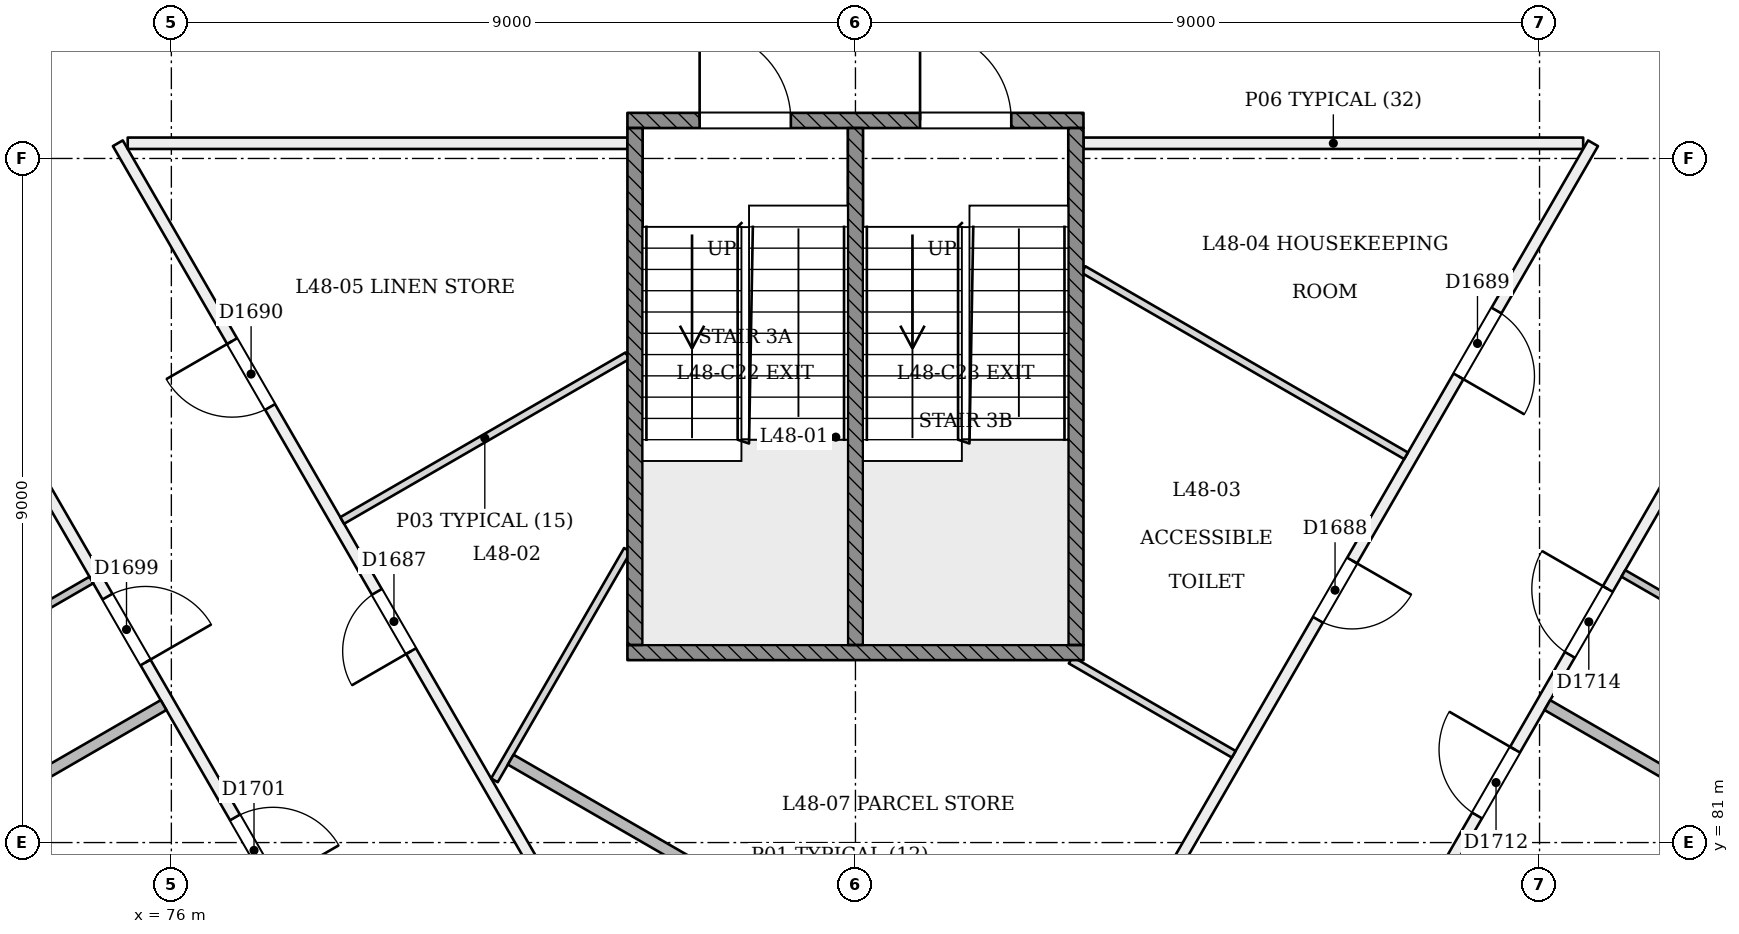
"""IFC4 building model, lengths in metres.
Left out: names, types, materials, properties, quantities, classifications, styles, units other than length and angle.
Written with IfcOpenShell. Run it as: python <this file> out.ifc"""

import sys

from ifc_helpers import new_model, si_unit, direction, frame, frame_2d, origin, place, context, subcontext, project, spatial, rectangle, extrude, element, fill, save


model = new_model("IFC4")
c1 = context("Model", 3, precision=1e-05, world=origin(), true_north=direction((0.0, 1.0)))
c2 = subcontext(c1, "Body", "Model", "MODEL_VIEW")
j1 = project(units=[si_unit("LENGTHUNIT", "METRE"), si_unit("PLANEANGLEUNIT", "RADIAN")], contexts=[c1])
p1 = place(None, origin())
s1 = spatial("IfcSite", under=j1, at=p1, CompositionType="ELEMENT")
p2 = place(p1, origin())
s2 = spatial("IfcBuilding", under=s1, at=p2, CompositionType="ELEMENT")
p3 = place(p2, frame((0.0, 0.0, 185.4)))
s3 = spatial("IfcBuildingStorey", under=s2, at=p3, CompositionType="ELEMENT", Elevation=185.4)
p4 = place(p3, frame((88.0, 90.2, 0.0), z_axis=(0.0, 0.0, 1.0), x_axis=(1.0, 0.0, 0.0)))
e1 = element("IfcWall", 1, at=p4, inside=s3, PredefinedType="PARTITIONING", context=c2, shape_type="SweptSolid", body=[
    extrude(rectangle(XDim=6.574, YDim=0.15, at=frame_2d((3.287, 0.0))), origin(), (0.0, 0.0, 1.0), 3.3),
])
p5 = place(p3, frame((85.0, 73.392, 0.0), z_axis=(0.0, 0.0, 1.0), x_axis=(-0.500003025806, 0.866023656828, 0.0)))
e2 = element("IfcWall", 2, at=p5, inside=s3, PredefinedType="PARTITIONING", context=c2, shape_type="SweptSolid", body=[
    extrude(rectangle(XDim=19.408, YDim=0.15, at=frame_2d((9.704, 0.0))), origin(), (0.0, 0.0, 1.0), 3.3),
])
p6 = place(p5, frame((11.693, 0.0, 0.0)))
e3 = element("IfcOpeningElement", 3, at=p6, cuts=e2, PredefinedType="OPENING", context=c2, shape_type="SweptSolid", body=[
    extrude(rectangle(XDim=0.9, YDim=2.1, at=frame_2d((0.45, 1.05))), frame((0.0, 0.085, 0.0), z_axis=(0.0, -1.0, 0.0), x_axis=(1.0, 0.0, 0.0)), (0.0, 0.0, 1.0), 0.171),
])
p7 = place(p5, frame((15.402, 0.0, 0.0)))
e4 = element("IfcOpeningElement", 4, at=p7, cuts=e2, PredefinedType="OPENING", context=c2, shape_type="SweptSolid", body=[
    extrude(rectangle(XDim=1.0, YDim=2.1, at=frame_2d((0.5, 1.05))), frame((0.0, 0.085, 0.0), z_axis=(0.0, -1.0, 0.0), x_axis=(1.0, 0.0, 0.0)), (0.0, 0.0, 1.0), 0.171),
])
p8 = place(p5, frame((3.845, 0.0, 0.0)))
e5 = element("IfcOpeningElement", 5, at=p8, cuts=e2, PredefinedType="OPENING", context=c2, shape_type="SweptSolid", body=[
    extrude(rectangle(XDim=1.0, YDim=2.1, at=frame_2d((0.5, 1.05))), frame((0.0, 0.085, 0.0), z_axis=(0.0, -1.0, 0.0), x_axis=(1.0, 0.0, 0.0)), (0.0, 0.0, 1.0), 0.171),
])
p9 = place(p3, frame((75.426, 90.2, 0.0), z_axis=(0.0, 0.0, 1.0), x_axis=(1.0, 0.0, 0.0)))
e6 = element("IfcWall", 6, at=p9, inside=s3, PredefinedType="PARTITIONING", context=c2, shape_type="SweptSolid", body=[
    extrude(rectangle(XDim=6.574, YDim=0.15, at=frame_2d((3.287, 0.0))), origin(), (0.0, 0.0, 1.0), 3.3),
])
p10 = place(p3, frame((94.704, 90.2, 0.0), z_axis=(0.0, 0.0, 1.0), x_axis=(-0.500004551397, -0.866022776018, 0.0)))
e7 = element("IfcWall", 7, at=p10, inside=s3, PredefinedType="PARTITIONING", context=c2, shape_type="SweptSolid", body=[
    extrude(rectangle(XDim=19.278, YDim=0.15, at=frame_2d((9.639, 0.0))), origin(), (0.0, 0.0, 1.0), 3.3),
])
p11 = place(p10, frame((6.339, 0.0, 0.0)))
e8 = element("IfcOpeningElement", 8, at=p11, cuts=e7, PredefinedType="OPENING", context=c2, shape_type="SweptSolid", body=[
    extrude(rectangle(XDim=0.9, YDim=2.1, at=frame_2d((0.45, 1.05))), frame((0.0, 0.085, 0.0), z_axis=(0.0, -1.0, 0.0), x_axis=(1.0, 0.0, 0.0)), (0.0, 0.0, 1.0), 0.171),
])
p12 = place(p10, frame((2.541, 0.0, 0.0)))
e9 = element("IfcOpeningElement", 9, at=p12, cuts=e7, PredefinedType="OPENING", context=c2, shape_type="SweptSolid", body=[
    extrude(rectangle(XDim=1.0, YDim=2.1, at=frame_2d((0.5, 1.05))), frame((0.0, 0.085, 0.0), z_axis=(0.0, -1.0, 0.0), x_axis=(1.0, 0.0, 0.0)), (0.0, 0.0, 1.0), 0.171),
])
p13 = place(p10, frame((11.64, 0.0, 0.0)))
e10 = element("IfcOpeningElement", 10, at=p13, cuts=e7, PredefinedType="OPENING", context=c2, shape_type="SweptSolid", body=[
    extrude(rectangle(XDim=1.0, YDim=2.1, at=frame_2d((0.5, 1.05))), frame((0.0, 0.085, 0.0), z_axis=(0.0, -1.0, 0.0), x_axis=(1.0, 0.0, 0.0)), (0.0, 0.0, 1.0), 0.171),
])
p14 = place(p3, frame((71.716, 90.2, 0.0), z_axis=(0.0, 0.0, 1.0), x_axis=(0.500001662319, -0.866024444042, 0.0)))
e11 = element("IfcWall", 11, at=p14, inside=s3, PredefinedType="PARTITIONING", context=c2, shape_type="SweptSolid", body=[
    extrude(rectangle(XDim=26.492, YDim=0.15, at=frame_2d((13.246, 0.0))), origin(), (0.0, 0.0, 1.0), 2.9),
])
p15 = place(p14, frame((0.23, 0.0, 0.0)))
e12 = element("IfcOpeningElement", 12, at=p15, cuts=e11, PredefinedType="OPENING", context=c2, shape_type="SweptSolid", body=[
    extrude(rectangle(XDim=1.0, YDim=2.1, at=frame_2d((0.5, 1.05))), frame((0.0, 0.085, 0.0), z_axis=(0.0, -1.0, 0.0), x_axis=(1.0, 0.0, 0.0)), (0.0, 0.0, 1.0), 0.171),
])
p16 = place(p14, frame((6.887, 0.0, 0.0)))
e13 = element("IfcOpeningElement", 13, at=p16, cuts=e11, PredefinedType="OPENING", context=c2, shape_type="SweptSolid", body=[
    extrude(rectangle(XDim=1.0, YDim=2.1, at=frame_2d((0.5, 1.05))), frame((0.0, 0.085, 0.0), z_axis=(0.0, -1.0, 0.0), x_axis=(1.0, 0.0, 0.0)), (0.0, 0.0, 1.0), 0.171),
])
p17 = place(p14, frame((10.242, 0.0, 0.0)))
e14 = element("IfcOpeningElement", 14, at=p17, cuts=e11, PredefinedType="OPENING", context=c2, shape_type="SweptSolid", body=[
    extrude(rectangle(XDim=1.0, YDim=2.1, at=frame_2d((0.5, 1.05))), frame((0.0, 0.085, 0.0), z_axis=(0.0, -1.0, 0.0), x_axis=(1.0, 0.0, 0.0)), (0.0, 0.0, 1.0), 0.171),
])
p18 = place(p14, frame((14.742, 0.0, 0.0)))
e15 = element("IfcOpeningElement", 15, at=p18, cuts=e11, PredefinedType="OPENING", context=c2, shape_type="SweptSolid", body=[
    extrude(rectangle(XDim=1.0, YDim=2.1, at=frame_2d((0.5, 1.05))), frame((0.0, 0.085, 0.0), z_axis=(0.0, -1.0, 0.0), x_axis=(1.0, 0.0, 0.0)), (0.0, 0.0, 1.0), 0.171),
])
p19 = place(p14, frame((18.212, 0.0, 0.0)))
e16 = element("IfcOpeningElement", 16, at=p19, cuts=e11, PredefinedType="OPENING", context=c2, shape_type="SweptSolid", body=[
    extrude(rectangle(XDim=1.0, YDim=2.1, at=frame_2d((0.5, 1.05))), frame((0.0, 0.085, 0.0), z_axis=(0.0, -1.0, 0.0), x_axis=(1.0, 0.0, 0.0)), (0.0, 0.0, 1.0), 0.171),
])
p20 = place(p14, frame((24.771, 0.0, 0.0)))
e17 = element("IfcOpeningElement", 17, at=p20, cuts=e11, PredefinedType="OPENING", context=c2, shape_type="SweptSolid", body=[
    extrude(rectangle(XDim=1.0, YDim=2.1, at=frame_2d((0.5, 1.05))), frame((0.0, 0.085, 0.0), z_axis=(0.0, -1.0, 0.0), x_axis=(1.0, 0.0, 0.0)), (0.0, 0.0, 1.0), 0.171),
])
p21 = place(p3, frame((85.076, 67.323, 0.0), z_axis=(0.0, 0.0, 1.0), x_axis=(0.499999794657, 0.866025522339, 0.0)))
e18 = element("IfcWall", 18, at=p21, inside=s3, PredefinedType="PARTITIONING", context=c2, shape_type="SweptSolid", body=[
    extrude(rectangle(XDim=26.416, YDim=0.15, at=frame_2d((13.208, 0.0))), origin(), (0.0, 0.0, 1.0), 2.9),
])
p22 = place(p21, frame((0.457, 0.0, 0.0)))
e19 = element("IfcOpeningElement", 19, at=p22, cuts=e18, PredefinedType="OPENING", context=c2, shape_type="SweptSolid", body=[
    extrude(rectangle(XDim=1.2, YDim=2.1, at=frame_2d((0.6, 1.05))), frame((0.0, 0.085, 0.0), z_axis=(0.0, -1.0, 0.0), x_axis=(1.0, 0.0, 0.0)), (0.0, 0.0, 1.0), 0.171),
])
p23 = place(p21, frame((7.32, 0.0, 0.0)))
e20 = element("IfcOpeningElement", 20, at=p23, cuts=e18, PredefinedType="OPENING", context=c2, shape_type="SweptSolid", body=[
    extrude(rectangle(XDim=1.0, YDim=2.1, at=frame_2d((0.5, 1.05))), frame((0.0, 0.085, 0.0), z_axis=(0.0, -1.0, 0.0), x_axis=(1.0, 0.0, 0.0)), (0.0, 0.0, 1.0), 0.171),
])
p24 = place(p21, frame((9.645, 0.0, 0.0)))
e21 = element("IfcOpeningElement", 21, at=p24, cuts=e18, PredefinedType="OPENING", context=c2, shape_type="SweptSolid", body=[
    extrude(rectangle(XDim=1.0, YDim=2.1, at=frame_2d((0.5, 1.05))), frame((0.0, 0.085, 0.0), z_axis=(0.0, -1.0, 0.0), x_axis=(1.0, 0.0, 0.0)), (0.0, 0.0, 1.0), 0.171),
])
p25 = place(p21, frame((16.204, 0.0, 0.0)))
e22 = element("IfcOpeningElement", 22, at=p25, cuts=e18, PredefinedType="OPENING", context=c2, shape_type="SweptSolid", body=[
    extrude(rectangle(XDim=1.0, YDim=2.1, at=frame_2d((0.5, 1.05))), frame((0.0, 0.085, 0.0), z_axis=(0.0, -1.0, 0.0), x_axis=(1.0, 0.0, 0.0)), (0.0, 0.0, 1.0), 0.171),
])
p26 = place(p21, frame((18.645, 0.0, 0.0)))
e23 = element("IfcOpeningElement", 23, at=p26, cuts=e18, PredefinedType="OPENING", context=c2, shape_type="SweptSolid", body=[
    extrude(rectangle(XDim=1.0, YDim=2.1, at=frame_2d((0.5, 1.05))), frame((0.0, 0.085, 0.0), z_axis=(0.0, -1.0, 0.0), x_axis=(1.0, 0.0, 0.0)), (0.0, 0.0, 1.0), 0.171),
])
p27 = place(p21, frame((24.158, 0.0, 0.0)))
e24 = element("IfcOpeningElement", 24, at=p27, cuts=e18, PredefinedType="OPENING", context=c2, shape_type="SweptSolid", body=[
    extrude(rectangle(XDim=1.0, YDim=2.1, at=frame_2d((0.5, 1.05))), frame((0.0, 0.085, 0.0), z_axis=(0.0, -1.0, 0.0), x_axis=(1.0, 0.0, 0.0)), (0.0, 0.0, 1.0), 0.171),
])
p28 = place(p3, frame((82.0, 87.404, 0.0), z_axis=(0.0, 0.0, 1.0), x_axis=(-0.866022320763, -0.500005339912, 0.0)))
e25 = element("IfcWall", 25, at=p28, inside=s3, PredefinedType="PARTITIONING", context=c2, shape_type="SweptSolid", body=[
    extrude(rectangle(XDim=4.333, YDim=0.1, at=frame_2d((2.167, 0.0))), origin(), (0.0, 0.0, 1.0), 3.3),
])
p29 = place(p3, frame((80.25, 81.819, 0.0), z_axis=(0.0, 0.0, 1.0), x_axis=(0.499988162555, 0.866032238029, 0.0)))
e26 = element("IfcWall", 26, at=p29, inside=s3, PredefinedType="PARTITIONING", context=c2, shape_type="SweptSolid", body=[
    extrude(rectangle(XDim=3.5, YDim=0.1, at=frame_2d((1.75, 0.0))), origin(), (0.0, 0.0, 1.0), 3.3),
])
p30 = place(p3, frame((92.244, 86.089, 0.0), z_axis=(0.0, 0.0, 1.0), x_axis=(-0.866036242063, 0.49998122708, 0.0)))
e27 = element("IfcWall", 27, at=p30, inside=s3, PredefinedType="PARTITIONING", context=c2, shape_type="SweptSolid", body=[
    extrude(rectangle(XDim=4.9, YDim=0.1, at=frame_2d((2.45, 0.0))), origin(), (0.0, 0.0, 1.0), 3.3),
])
p31 = place(p3, frame((87.832, 83.4, 0.0), z_axis=(0.0, 0.0, 1.0), x_axis=(0.866019742871, -0.500009804862, 0.0)))
e28 = element("IfcWall", 28, at=p31, inside=s3, PredefinedType="PARTITIONING", context=c2, shape_type="SweptSolid", body=[
    extrude(rectangle(XDim=2.476, YDim=0.1, at=frame_2d((1.238, 0.0))), origin(), (0.0, 0.0, 1.0), 3.3),
])
p32 = place(p3, frame((87.568, 77.99, 0.0), z_axis=(0.0, 0.0, 1.0), x_axis=(-0.866018040531, 0.500012753312, 0.0)))
e29 = element("IfcWall", 29, at=p32, inside=s3, PredefinedType="PARTITIONING", context=c2, shape_type="SweptSolid", body=[
    extrude(rectangle(XDim=8.202, YDim=0.15, at=frame_2d((4.101, 0.0))), origin(), (0.0, 0.0, 1.0), 3.3),
])
p33 = place(p3, frame((74.947, 84.454, 0.0), z_axis=(0.0, 0.0, 1.0), x_axis=(-0.86601045545, -0.500025890382, 0.0)))
e30 = element("IfcWall", 30, at=p33, inside=s3, PredefinedType="PARTITIONING", context=c2, shape_type="SweptSolid", body=[
    extrude(rectangle(XDim=2.925, YDim=0.1, at=frame_2d((1.462, 0.0))), origin(), (0.0, 0.0, 1.0), 3.3),
])
p34 = place(p33, frame((0.975, 0.0, 0.0)))
e31 = element("IfcOpeningElement", 31, at=p34, cuts=e30, PredefinedType="OPENING", context=c2, shape_type="SweptSolid", body=[
    extrude(rectangle(XDim=0.9, YDim=2.1, at=frame_2d((0.45, 1.05))), frame((0.0, 0.061, 0.0), z_axis=(0.0, -1.0, 0.0), x_axis=(1.0, 0.0, 0.0)), (0.0, 0.0, 1.0), 0.121),
])
p35 = place(p3, frame((70.402, 79.636, 0.0), z_axis=(0.0, 0.0, 1.0), x_axis=(0.866025401434, 0.500000004071, 0.0)))
e32 = element("IfcWall", 32, at=p35, inside=s3, PredefinedType="PARTITIONING", context=c2, shape_type="SweptSolid", body=[
    extrude(rectangle(XDim=6.345, YDim=0.15, at=frame_2d((3.173, 0.0))), origin(), (0.0, 0.0, 1.0), 3.3),
])
p36 = place(p3, frame((93.103, 81.076, 0.0), z_axis=(0.0, 0.0, 1.0), x_axis=(0.866048868473, -0.499959355765, 0.0)))
e33 = element("IfcWall", 33, at=p36, inside=s3, PredefinedType="PARTITIONING", context=c2, shape_type="SweptSolid", body=[
    extrude(rectangle(XDim=2.825, YDim=0.1, at=frame_2d((1.413, 0.0))), origin(), (0.0, 0.0, 1.0), 3.3),
])
p37 = place(p3, frame((99.598, 79.636, 0.0), z_axis=(0.0, 0.0, 1.0), x_axis=(-0.866025401434, 0.500000004071, 0.0)))
e34 = element("IfcWall", 34, at=p37, inside=s3, PredefinedType="PARTITIONING", context=c2, shape_type="SweptSolid", body=[
    extrude(rectangle(XDim=6.345, YDim=0.15, at=frame_2d((3.173, 0.0))), origin(), (0.0, 0.0, 1.0), 3.3),
])
p38 = place(p3, frame((97.549, 83.128, 0.0), z_axis=(0.0, 0.0, 1.0), x_axis=(-0.866048868473, 0.499959355765, 0.0)))
e35 = element("IfcWall", 35, at=p38, inside=s3, PredefinedType="PARTITIONING", context=c2, shape_type="SweptSolid", body=[
    extrude(rectangle(XDim=2.825, YDim=0.1, at=frame_2d((1.413, 0.0))), origin(), (0.0, 0.0, 1.0), 3.3),
])
p39 = place(p38, frame((1.0, 0.0, 0.0)))
e36 = element("IfcOpeningElement", 36, at=p39, cuts=e35, PredefinedType="OPENING", context=c2, shape_type="SweptSolid", body=[
    extrude(rectangle(XDim=0.9, YDim=2.1, at=frame_2d((0.45, 1.05))), frame((0.0, 0.061, 0.0), z_axis=(0.0, -1.0, 0.0), x_axis=(1.0, 0.0, 0.0)), (0.0, 0.0, 1.0), 0.121),
])
p40 = place(p3, frame((82.0, 90.5, 0.0), z_axis=(0.0, 0.0, 1.0), x_axis=(1.0, 0.0, 0.0)))
e37 = element("IfcWall", 37, at=p40, inside=s3, PredefinedType="SOLIDWALL", context=c2, shape_type="SweptSolid", body=[
    extrude(rectangle(XDim=6.0, YDim=0.2, at=frame_2d((3.0, 0.0))), origin(), (0.0, 0.0, 1.0), 3.3),
])
p41 = place(p40, frame((0.95, 0.0, 0.0)))
e38 = element("IfcOpeningElement", 38, at=p41, cuts=e37, PredefinedType="OPENING", context=c2, shape_type="SweptSolid", body=[
    extrude(rectangle(XDim=1.2, YDim=2.1, at=frame_2d((0.6, 1.05))), frame((0.0, 0.11, 0.0), z_axis=(0.0, -1.0, 0.0), x_axis=(1.0, 0.0, 0.0)), (0.0, 0.0, 1.0), 0.221),
])
p42 = place(p40, frame((3.85, 0.0, 0.0)))
e39 = element("IfcOpeningElement", 39, at=p42, cuts=e37, PredefinedType="OPENING", context=c2, shape_type="SweptSolid", body=[
    extrude(rectangle(XDim=1.2, YDim=2.1, at=frame_2d((0.6, 1.05))), frame((0.0, 0.11, 0.0), z_axis=(0.0, -1.0, 0.0), x_axis=(1.0, 0.0, 0.0)), (0.0, 0.0, 1.0), 0.221),
])
p43 = place(p3, frame((82.0, 83.5, 0.0), z_axis=(0.0, 0.0, 1.0), x_axis=(1.0, 0.0, 0.0)))
e40 = element("IfcWall", 40, at=p43, inside=s3, PredefinedType="SOLIDWALL", context=c2, shape_type="SweptSolid", body=[
    extrude(rectangle(XDim=6.0, YDim=0.2, at=frame_2d((3.0, 0.0))), origin(), (0.0, 0.0, 1.0), 3.3),
])
for number, where, z_axis, x_axis in (
    (41, (82.1, 83.6, 0.0), (0.0, 0.0, 1.0), (0.0, 1.0, 0.0)),
    (42, (87.9, 83.6, 0.0), (0.0, 0.0, 1.0), (0.0, 1.0, 0.0)),
    (43, (85.0, 83.6, 0.0), (0.0, 0.0, 1.0), (0.0, 1.0, 0.0)),
):
    element("IfcWall", number, at=place(p3, frame(where, z_axis=z_axis, x_axis=x_axis)), inside=s3, PredefinedType="SOLIDWALL", context=c2, shape_type="SweptSolid", body=[
        extrude(rectangle(XDim=6.8, YDim=0.2, at=frame_2d((3.4, 0.0))), origin(), (0.0, 0.0, 1.0), 3.3),
    ])
p44 = place(p6, origin())
e44 = element("IfcDoor", 44, at=p44, inside=s3, OperationType="SINGLE_SWING_LEFT", PredefinedType="NOTDEFINED", context=c2, shape_type="SweptSolid", body=[
    extrude(rectangle(XDim=0.9, YDim=2.1, at=frame_2d((0.45, 1.05))), frame((0.0, 0.025, 0.0), z_axis=(0.0, -1.0, 0.0), x_axis=(1.0, 0.0, 0.0)), (0.0, 0.0, 1.0), 0.05),
])
fill(e3, e44)
p45 = place(p11, origin())
e45 = element("IfcDoor", 45, at=p45, inside=s3, OperationType="SINGLE_SWING_LEFT", PredefinedType="NOTDEFINED", context=c2, shape_type="SweptSolid", body=[
    extrude(rectangle(XDim=0.9, YDim=2.1, at=frame_2d((0.45, 1.05))), frame((0.0, 0.025, 0.0), z_axis=(0.0, -1.0, 0.0), x_axis=(1.0, 0.0, 0.0)), (0.0, 0.0, 1.0), 0.05),
])
fill(e8, e45)
p46 = place(p12, origin())
e46 = element("IfcDoor", 46, at=p46, inside=s3, OperationType="SINGLE_SWING_RIGHT", PredefinedType="NOTDEFINED", context=c2, shape_type="SweptSolid", body=[
    extrude(rectangle(XDim=1.0, YDim=2.1, at=frame_2d((0.5, 1.05))), frame((0.0, 0.025, 0.0), z_axis=(0.0, -1.0, 0.0), x_axis=(1.0, 0.0, 0.0)), (0.0, 0.0, 1.0), 0.05),
])
fill(e9, e46)
p47 = place(p7, origin())
e47 = element("IfcDoor", 47, at=p47, inside=s3, OperationType="SINGLE_SWING_RIGHT", PredefinedType="NOTDEFINED", context=c2, shape_type="SweptSolid", body=[
    extrude(rectangle(XDim=1.0, YDim=2.1, at=frame_2d((0.5, 1.05))), frame((0.0, 0.025, 0.0), z_axis=(0.0, -1.0, 0.0), x_axis=(1.0, 0.0, 0.0)), (0.0, 0.0, 1.0), 0.05),
])
fill(e4, e47)
p48 = place(p16, origin())
e48 = element("IfcDoor", 48, at=p48, inside=s3, OperationType="SINGLE_SWING_RIGHT", PredefinedType="NOTDEFINED", context=c2, shape_type="SweptSolid", body=[
    extrude(rectangle(XDim=1.0, YDim=2.1, at=frame_2d((0.5, 1.05))), frame((0.0, 0.025, 0.0), z_axis=(0.0, -1.0, 0.0), x_axis=(1.0, 0.0, 0.0)), (0.0, 0.0, 1.0), 0.05),
])
fill(e13, e48)
p49 = place(p17, origin())
e49 = element("IfcDoor", 49, at=p49, inside=s3, OperationType="SINGLE_SWING_RIGHT", PredefinedType="NOTDEFINED", context=c2, shape_type="SweptSolid", body=[
    extrude(rectangle(XDim=1.0, YDim=2.1, at=frame_2d((0.5, 1.05))), frame((0.0, 0.025, 0.0), z_axis=(0.0, -1.0, 0.0), x_axis=(1.0, 0.0, 0.0)), (0.0, 0.0, 1.0), 0.05),
])
fill(e14, e49)
p50 = place(p25, origin())
e50 = element("IfcDoor", 50, at=p50, inside=s3, OperationType="SINGLE_SWING_RIGHT", PredefinedType="NOTDEFINED", context=c2, shape_type="SweptSolid", body=[
    extrude(rectangle(XDim=1.0, YDim=2.1, at=frame_2d((0.5, 1.05))), frame((0.0, 0.025, 0.0), z_axis=(0.0, -1.0, 0.0), x_axis=(1.0, 0.0, 0.0)), (0.0, 0.0, 1.0), 0.05),
])
fill(e22, e50)
p51 = place(p26, origin())
e51 = element("IfcDoor", 51, at=p51, inside=s3, OperationType="SINGLE_SWING_RIGHT", PredefinedType="NOTDEFINED", context=c2, shape_type="SweptSolid", body=[
    extrude(rectangle(XDim=1.0, YDim=2.1, at=frame_2d((0.5, 1.05))), frame((0.0, 0.025, 0.0), z_axis=(0.0, -1.0, 0.0), x_axis=(1.0, 0.0, 0.0)), (0.0, 0.0, 1.0), 0.05),
])
fill(e23, e51)
p52 = place(p41, origin())
e52 = element("IfcDoor", 52, at=p52, inside=s3, OperationType="SINGLE_SWING_LEFT", PredefinedType="NOTDEFINED", context=c2, shape_type="SweptSolid", body=[
    extrude(rectangle(XDim=1.2, YDim=2.1, at=frame_2d((0.6, 1.05))), frame((0.0, 0.025, 0.0), z_axis=(0.0, -1.0, 0.0), x_axis=(1.0, 0.0, 0.0)), (0.0, 0.0, 1.0), 0.05),
])
fill(e38, e52)
p53 = place(p42, origin())
e53 = element("IfcDoor", 53, at=p53, inside=s3, OperationType="SINGLE_SWING_LEFT", PredefinedType="NOTDEFINED", context=c2, shape_type="SweptSolid", body=[
    extrude(rectangle(XDim=1.2, YDim=2.1, at=frame_2d((0.6, 1.05))), frame((0.0, 0.025, 0.0), z_axis=(0.0, -1.0, 0.0), x_axis=(1.0, 0.0, 0.0)), (0.0, 0.0, 1.0), 0.05),
])
fill(e39, e53)
save(model, sys.argv[1])
